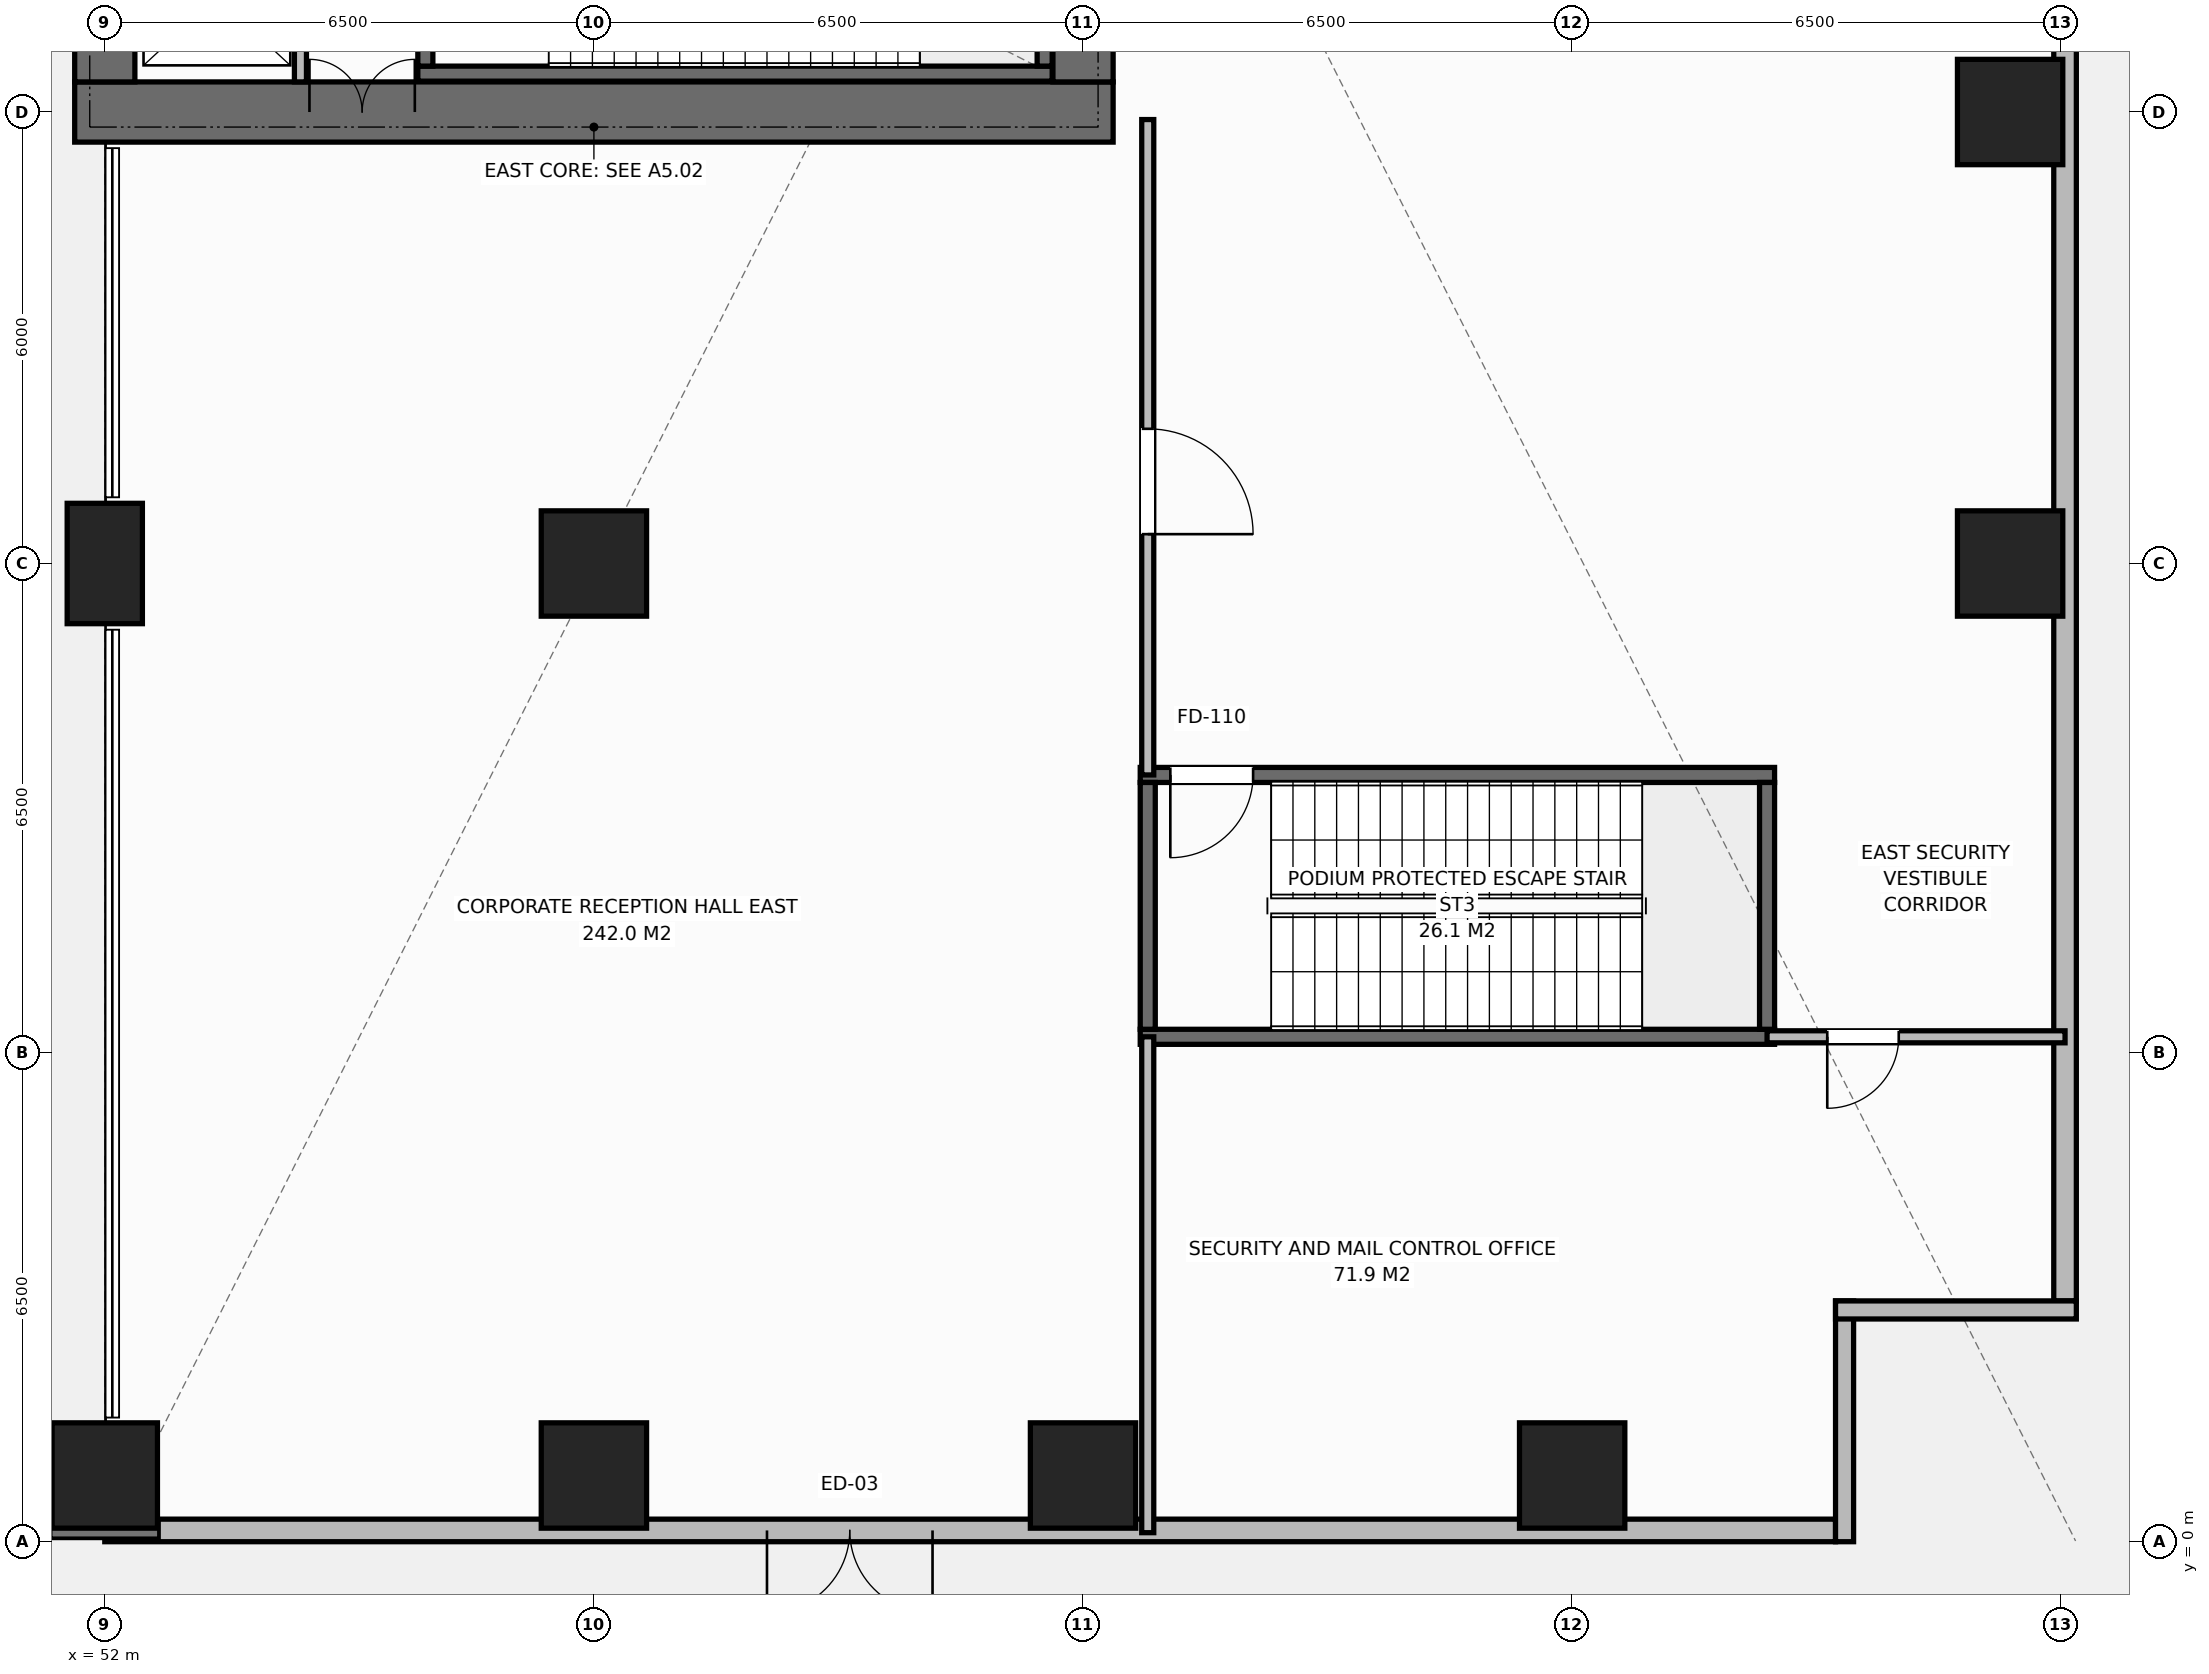
"""IFC4 building model, lengths in metres.
Left out: names, types, materials, properties, quantities, classifications, styles, units other than length and angle.
Written with IfcOpenShell. Run it as: python <this file> out.ifc"""

import sys

from ifc_helpers import new_model, si_unit, direction, frame, frame_2d, origin, origin_2d, place, context, subcontext, project, spatial, rectangle, extrude, element, fill, save


model = new_model("IFC4")
c1 = context("Model", 3, precision=1e-05, world=origin(), true_north=direction((0.0, 1.0)))
c2 = subcontext(c1, "Body", "Model", "MODEL_VIEW")
j1 = project(units=[si_unit("LENGTHUNIT", "METRE"), si_unit("PLANEANGLEUNIT", "RADIAN")], contexts=[c1])
p1 = place(None, origin())
s1 = spatial("IfcSite", under=j1, at=p1, CompositionType="ELEMENT")
p2 = place(p1, origin())
s2 = spatial("IfcBuilding", under=s1, at=p2, CompositionType="ELEMENT")
p3 = place(p2, origin())
s3 = spatial("IfcBuildingStorey", under=s2, at=p3, CompositionType="ELEMENT", Elevation=0.0)
p4 = place(p3, frame((51.6, 19.0, 0.0), z_axis=(0.0, 0.0, 1.0), x_axis=(1.0, 0.0, 0.0)))
e1 = element("IfcWall", 1, at=p4, inside=s3, PredefinedType="SHEAR", context=c2, shape_type="SweptSolid", body=[
    extrude(rectangle(XDim=13.8, YDim=0.8, at=frame_2d((6.9, 0.0))), origin(), (0.0, 0.0, 1.0), 6.0),
])
p5 = place(p4, frame((3.12, 0.0, 0.0)))
e2 = element("IfcOpeningElement", 2, at=p5, cuts=e1, PredefinedType="OPENING", context=c2, shape_type="SweptSolid", body=[
    extrude(rectangle(XDim=1.4, YDim=2.2, at=frame_2d((0.7, 1.1))), frame((0.0, 0.41, 0.0), z_axis=(0.0, -1.0, 0.0), x_axis=(1.0, 0.0, 0.0)), (0.0, 0.0, 1.0), 0.82),
])
p6 = place(p3, frame((52.0, 19.4, 0.0), z_axis=(0.0, 0.0, 1.0), x_axis=(0.0, 1.0, 0.0)))
e3 = element("IfcWall", 3, at=p6, inside=s3, PredefinedType="SHEAR", context=c2, shape_type="SweptSolid", body=[
    extrude(rectangle(XDim=13.2, YDim=0.8, at=frame_2d((6.6, 0.0))), origin(), (0.0, 0.0, 1.0), 6.0),
])
p7 = place(p3, frame((65.0, 19.4, 0.0), z_axis=(0.0, 0.0, 1.0), x_axis=(0.0, 1.0, 0.0)))
e4 = element("IfcWall", 4, at=p7, inside=s3, PredefinedType="SHEAR", context=c2, shape_type="SweptSolid", body=[
    extrude(rectangle(XDim=13.2, YDim=0.8, at=frame_2d((6.6, 0.0))), origin(), (0.0, 0.0, 1.0), 6.0),
])
p8 = place(p7, frame((8.05, 0.0, 0.0)))
e5 = element("IfcOpeningElement", 5, at=p8, cuts=e4, PredefinedType="OPENING", context=c2, shape_type="SweptSolid", body=[
    extrude(rectangle(XDim=1.3, YDim=2.2, at=frame_2d((0.65, 1.1))), frame((0.0, 0.41, 0.0), z_axis=(0.0, -1.0, 0.0), x_axis=(1.0, 0.0, 0.0)), (0.0, 0.0, 1.0), 0.82),
])
p9 = place(p3, frame((56.16, 19.51, 0.0), z_axis=(0.0, 0.0, 1.0), x_axis=(1.0, 0.0, 0.0)))
e6 = element("IfcWall", 6, at=p9, inside=s3, PredefinedType="SHEAR", context=c2, shape_type="SweptSolid", body=[
    extrude(rectangle(XDim=8.43, YDim=0.2, at=frame_2d((4.215, 0.0))), origin(), (0.0, 0.0, 1.0), 6.0),
])
for number, where, z_axis, x_axis in (
    (7, (56.26, 19.61, 0.0), (0.0, 0.0, 1.0), (0.0, 1.0, 0.0)),
    (8, (64.49, 19.61, 0.0), (0.0, 0.0, 1.0), (0.0, 1.0, 0.0)),
):
    element("IfcWall", number, at=place(p3, frame(where, z_axis=z_axis, x_axis=x_axis)), inside=s3, PredefinedType="SHEAR", context=c2, shape_type="SweptSolid", body=[
        extrude(rectangle(XDim=3.28, YDim=0.2, at=frame_2d((1.64, 0.0))), origin(), (0.0, 0.0, 1.0), 6.0),
    ])
p10 = place(p3, frame((65.76, 6.71, 0.0), z_axis=(0.0, 0.0, 1.0), x_axis=(1.0, 0.0, 0.0)))
e9 = element("IfcWall", 9, at=p10, inside=s3, PredefinedType="SHEAR", context=c2, shape_type="SweptSolid", body=[
    extrude(rectangle(XDim=8.43, YDim=0.2, at=frame_2d((4.215, 0.0))), origin(), (0.0, 0.0, 1.0), 6.0),
])
p11 = place(p3, frame((65.76, 10.19, 0.0), z_axis=(0.0, 0.0, 1.0), x_axis=(1.0, 0.0, 0.0)))
e10 = element("IfcWall", 10, at=p11, inside=s3, PredefinedType="SHEAR", context=c2, shape_type="SweptSolid", body=[
    extrude(rectangle(XDim=8.43, YDim=0.2, at=frame_2d((4.215, 0.0))), origin(), (0.0, 0.0, 1.0), 6.0),
])
p12 = place(p11, frame((0.4, 0.0, 0.0)))
e11 = element("IfcOpeningElement", 11, at=p12, cuts=e10, PredefinedType="OPENING", context=c2, shape_type="SweptSolid", body=[
    extrude(rectangle(XDim=1.1, YDim=2.15, at=frame_2d((0.55, 1.075))), frame((0.0, 0.11, 0.0), z_axis=(0.0, -1.0, 0.0), x_axis=(1.0, 0.0, 0.0)), (0.0, 0.0, 1.0), 0.22),
])
for number, where, z_axis, x_axis in (
    (12, (65.86, 6.81, 0.0), (0.0, 0.0, 1.0), (0.0, 1.0, 0.0)),
    (13, (74.09, 6.81, 0.0), (0.0, 0.0, 1.0), (0.0, 1.0, 0.0)),
):
    element("IfcWall", number, at=place(p3, frame(where, z_axis=z_axis, x_axis=x_axis)), inside=s3, PredefinedType="SHEAR", context=c2, shape_type="SweptSolid", body=[
        extrude(rectangle(XDim=3.28, YDim=0.2, at=frame_2d((1.64, 0.0))), origin(), (0.0, 0.0, 1.0), 6.0),
    ])
p13 = place(p3, frame((58.5, 13.0, 0.0), z_axis=(0.0, 0.0, 1.0), x_axis=(1.0, 0.0, 0.0)))
e14 = element("IfcColumn", 14, at=p13, inside=s3, PredefinedType="COLUMN", context=c2, shape_type="SweptSolid", body=[
    extrude(rectangle(XDim=1.4, YDim=1.4, at=origin_2d()), origin(), (0.0, 0.0, 1.0), 6.0),
])
p14 = place(p3, frame((52.0, 13.0, 0.0), z_axis=(0.0, 0.0, 1.0), x_axis=(1.0, 0.0, 0.0)))
e15 = element("IfcColumn", 15, at=p14, inside=s3, PredefinedType="PILASTER", context=c2, shape_type="SweptSolid", body=[
    extrude(rectangle(XDim=1.0, YDim=1.6, at=origin_2d()), origin(), (0.0, 0.0, 1.0), 6.0),
])
for number, where, z_axis, x_axis in (
    (16, (52.0, 0.88, 0.0), (0.0, 0.0, 1.0), (1.0, 0.0, 0.0)),
    (17, (58.5, 0.88, 0.0), (0.0, 0.0, 1.0), (1.0, 0.0, 0.0)),
    (18, (65.0, 0.88, 0.0), (0.0, 0.0, 1.0), (1.0, 0.0, 0.0)),
    (19, (71.5, 0.88, 0.0), (0.0, 0.0, 1.0), (1.0, 0.0, 0.0)),
    (20, (77.32, 13.0, 0.0), (0.0, 0.0, 1.0), (1.0, 0.0, 0.0)),
    (21, (77.32, 19.0, 0.0), (0.0, 0.0, 1.0), (1.0, 0.0, 0.0)),
):
    element("IfcColumn", number, at=place(p3, frame(where, z_axis=z_axis, x_axis=x_axis)), inside=s3, PredefinedType="COLUMN", context=c2, shape_type="SweptSolid", body=[
        extrude(rectangle(XDim=1.4, YDim=1.4, at=origin_2d()), origin(), (0.0, 0.0, 1.0), 6.0),
    ])
p15 = place(p3, frame((75.0, 0.15, 0.0), z_axis=(0.0, 0.0, 1.0), x_axis=(-1.0, 0.0, 0.0)))
e22 = element("IfcWall", 22, at=p15, inside=s3, PredefinedType="STANDARD", context=c2, shape_type="SweptSolid", body=[
    extrude(rectangle(XDim=23.0, YDim=0.3, at=frame_2d((11.5, 0.0))), origin(), (0.0, 0.0, 1.0), 5.72),
])
p16 = place(p15, frame((12.0, 0.0, 0.0)))
e23 = element("IfcOpeningElement", 23, at=p16, cuts=e22, PredefinedType="OPENING", context=c2, shape_type="SweptSolid", body=[
    extrude(rectangle(XDim=2.2, YDim=2.4, at=frame_2d((1.1, 1.2))), frame((0.0, 0.16, 0.0), z_axis=(0.0, -1.0, 0.0), x_axis=(1.0, 0.0, 0.0)), (0.0, 0.0, 1.0), 0.32),
])
p17 = place(p3, frame((78.05, 48.8, 0.0), z_axis=(0.0, 0.0, 1.0), x_axis=(0.0, -1.0, 0.0)))
e24 = element("IfcWall", 24, at=p17, inside=s3, PredefinedType="STANDARD", context=c2, shape_type="SweptSolid", body=[
    extrude(rectangle(XDim=45.6, YDim=0.3, at=frame_2d((22.8, 0.0))), origin(), (0.0, 0.0, 1.0), 5.72),
])
p18 = place(p17, frame((2.6, 0.0, 0.0)))
e25 = element("IfcOpeningElement", 25, at=p18, cuts=e24, PredefinedType="OPENING", context=c2, shape_type="SweptSolid", body=[
    extrude(rectangle(XDim=6.0, YDim=3.2, at=frame_2d((3.0, 1.6))), frame((0.0, 0.16, 0.0), z_axis=(0.0, -1.0, 0.0), x_axis=(1.0, 0.0, 0.0)), (0.0, 0.0, 1.0), 0.32),
])
p19 = place(p17, frame((25.6, 0.0, 0.0)))
e26 = element("IfcOpeningElement", 26, at=p19, cuts=e24, PredefinedType="OPENING", context=c2, shape_type="SweptSolid", body=[
    extrude(rectangle(XDim=2.2, YDim=2.4, at=frame_2d((1.1, 1.2))), frame((0.0, 0.16, 0.0), z_axis=(0.0, -1.0, 0.0), x_axis=(1.0, 0.0, 0.0)), (0.0, 0.0, 1.0), 0.32),
])
for number, where, z_axis, x_axis in (
    (27, (75.12, 3.2, 0.0), (0.0, 0.0, 1.0), (0.0, -1.0, 0.0)),
    (28, (78.2, 3.08, 0.0), (0.0, 0.0, 1.0), (-1.0, 0.0, 0.0)),
):
    element("IfcWall", number, at=place(p3, frame(where, z_axis=z_axis, x_axis=x_axis)), inside=s3, PredefinedType="STANDARD", context=c2, shape_type="SweptSolid", body=[
        extrude(rectangle(XDim=3.2, YDim=0.24, at=frame_2d((1.6, 0.0))), origin(), (0.0, 0.0, 1.0), 5.72),
    ])
p20 = place(p3, frame((54.6, 19.4, 0.0), z_axis=(0.0, 0.0, 1.0), x_axis=(0.0, 1.0, 0.0)))
e29 = element("IfcWall", 29, at=p20, inside=s3, PredefinedType="STANDARD", context=c2, shape_type="SweptSolid", body=[
    extrude(rectangle(XDim=13.2, YDim=0.16, at=frame_2d((6.6, 0.0))), origin(), (0.0, 0.0, 1.0), 5.72),
])
p21 = place(p20, frame((0.55, 0.0, 0.0)))
e30 = element("IfcOpeningElement", 30, at=p21, cuts=e29, PredefinedType="OPENING", context=c2, shape_type="SweptSolid", body=[
    extrude(rectangle(XDim=1.1, YDim=2.2, at=frame_2d((0.55, 1.1))), frame((0.0, 0.09, 0.0), z_axis=(0.0, -1.0, 0.0), x_axis=(1.0, 0.0, 0.0)), (0.0, 0.0, 1.0), 0.18),
])
p22 = place(p20, frame((2.7, 0.0, 0.0)))
e31 = element("IfcOpeningElement", 31, at=p22, cuts=e29, PredefinedType="OPENING", context=c2, shape_type="SweptSolid", body=[
    extrude(rectangle(XDim=1.1, YDim=2.2, at=frame_2d((0.55, 1.1))), frame((0.0, 0.09, 0.0), z_axis=(0.0, -1.0, 0.0), x_axis=(1.0, 0.0, 0.0)), (0.0, 0.0, 1.0), 0.18),
])
p23 = place(p20, frame((4.9, 0.0, 0.0)))
e32 = element("IfcOpeningElement", 32, at=p23, cuts=e29, PredefinedType="OPENING", context=c2, shape_type="SweptSolid", body=[
    extrude(rectangle(XDim=1.1, YDim=2.2, at=frame_2d((0.55, 1.1))), frame((0.0, 0.09, 0.0), z_axis=(0.0, -1.0, 0.0), x_axis=(1.0, 0.0, 0.0)), (0.0, 0.0, 1.0), 0.18),
])
p24 = place(p20, frame((7.05, 0.0, 0.0)))
e33 = element("IfcOpeningElement", 33, at=p24, cuts=e29, PredefinedType="OPENING", context=c2, shape_type="SweptSolid", body=[
    extrude(rectangle(XDim=1.1, YDim=2.2, at=frame_2d((0.55, 1.1))), frame((0.0, 0.09, 0.0), z_axis=(0.0, -1.0, 0.0), x_axis=(1.0, 0.0, 0.0)), (0.0, 0.0, 1.0), 0.18),
])
p25 = place(p20, frame((9.2, 0.0, 0.0)))
e34 = element("IfcOpeningElement", 34, at=p25, cuts=e29, PredefinedType="OPENING", context=c2, shape_type="SweptSolid", body=[
    extrude(rectangle(XDim=1.1, YDim=2.2, at=frame_2d((0.55, 1.1))), frame((0.0, 0.09, 0.0), z_axis=(0.0, -1.0, 0.0), x_axis=(1.0, 0.0, 0.0)), (0.0, 0.0, 1.0), 0.18),
])
p26 = place(p20, frame((11.4, 0.0, 0.0)))
e35 = element("IfcOpeningElement", 35, at=p26, cuts=e29, PredefinedType="OPENING", context=c2, shape_type="SweptSolid", body=[
    extrude(rectangle(XDim=1.1, YDim=2.2, at=frame_2d((0.55, 1.1))), frame((0.0, 0.09, 0.0), z_axis=(0.0, -1.0, 0.0), x_axis=(1.0, 0.0, 0.0)), (0.0, 0.0, 1.0), 0.18),
])
p27 = place(p3, frame((65.86, 0.12, 0.0), z_axis=(0.0, 0.0, 1.0), x_axis=(0.0, 1.0, 0.0)))
e36 = element("IfcWall", 36, at=p27, inside=s3, PredefinedType="STANDARD", context=c2, shape_type="SweptSolid", body=[
    extrude(rectangle(XDim=6.59, YDim=0.16, at=frame_2d((3.295, 0.0))), origin(), (0.0, 0.0, 1.0), 5.72),
])
p28 = place(p3, frame((74.09, 6.71, 0.0), z_axis=(0.0, 0.0, 1.0), x_axis=(1.0, 0.0, 0.0)))
e37 = element("IfcWall", 37, at=p28, inside=s3, PredefinedType="STANDARD", context=c2, shape_type="SweptSolid", body=[
    extrude(rectangle(XDim=3.96, YDim=0.16, at=frame_2d((1.98, 0.0))), origin(), (0.0, 0.0, 1.0), 5.72),
])
p29 = place(p28, frame((0.8, 0.0, 0.0)))
e38 = element("IfcOpeningElement", 38, at=p29, cuts=e37, PredefinedType="OPENING", context=c2, shape_type="SweptSolid", body=[
    extrude(rectangle(XDim=0.95, YDim=2.15, at=frame_2d((0.475, 1.075))), frame((0.0, 0.09, 0.0), z_axis=(0.0, -1.0, 0.0), x_axis=(1.0, 0.0, 0.0)), (0.0, 0.0, 1.0), 0.18),
])
p30 = place(p3, frame((65.86, 10.19, 0.0), z_axis=(0.0, 0.0, 1.0), x_axis=(0.0, 1.0, 0.0)))
e39 = element("IfcWall", 39, at=p30, inside=s3, PredefinedType="STANDARD", context=c2, shape_type="SweptSolid", body=[
    extrude(rectangle(XDim=8.71, YDim=0.16, at=frame_2d((4.355, 0.0))), origin(), (0.0, 0.0, 1.0), 5.72),
])
p31 = place(p30, frame((3.2, 0.0, 0.0)))
e40 = element("IfcOpeningElement", 40, at=p31, cuts=e39, PredefinedType="OPENING", context=c2, shape_type="SweptSolid", body=[
    extrude(rectangle(XDim=1.4, YDim=2.2, at=frame_2d((0.7, 1.1))), frame((0.0, 0.09, 0.0), z_axis=(0.0, -1.0, 0.0), x_axis=(1.0, 0.0, 0.0)), (0.0, 0.0, 1.0), 0.18),
])
p32 = place(p16, origin())
e41 = element("IfcDoor", 41, at=p32, inside=s3, OperationType="DOUBLE_DOOR_SINGLE_SWING", PredefinedType="DOOR", context=c2, shape_type="SweptSolid", body=[
    extrude(rectangle(XDim=2.2, YDim=2.4, at=frame_2d((1.1, 1.2))), frame((0.0, 0.025, 0.0), z_axis=(0.0, -1.0, 0.0), x_axis=(1.0, 0.0, 0.0)), (0.0, 0.0, 1.0), 0.05),
])
fill(e23, e41)
p33 = place(p5, origin())
e42 = element("IfcDoor", 42, at=p33, inside=s3, OperationType="DOUBLE_DOOR_SINGLE_SWING", PredefinedType="DOOR", context=c2, shape_type="SweptSolid", body=[
    extrude(rectangle(XDim=1.4, YDim=2.2, at=frame_2d((0.7, 1.1))), frame((0.0, 0.125, 0.0), z_axis=(0.0, -1.0, 0.0), x_axis=(1.0, 0.0, 0.0)), (0.0, 0.0, 1.0), 0.05),
])
fill(e2, e42)
p34 = place(p12, origin())
e43 = element("IfcDoor", 43, at=p34, inside=s3, OperationType="SINGLE_SWING_RIGHT", PredefinedType="DOOR", context=c2, shape_type="SweptSolid", body=[
    extrude(rectangle(XDim=1.1, YDim=2.15, at=frame_2d((0.55, 1.075))), frame((0.0, 0.025, 0.0), z_axis=(0.0, -1.0, 0.0), x_axis=(1.0, 0.0, 0.0)), (0.0, 0.0, 1.0), 0.05),
])
fill(e11, e43)
p35 = place(p29, origin())
e44 = element("IfcDoor", 44, at=p35, inside=s3, OperationType="SINGLE_SWING_RIGHT", PredefinedType="DOOR", context=c2, shape_type="SweptSolid", body=[
    extrude(rectangle(XDim=0.95, YDim=2.15, at=frame_2d((0.475, 1.075))), frame((0.0, 0.025, 0.0), z_axis=(0.0, -1.0, 0.0), x_axis=(1.0, 0.0, 0.0)), (0.0, 0.0, 1.0), 0.05),
])
fill(e38, e44)
p36 = place(p31, origin())
e45 = element("IfcDoor", 45, at=p36, inside=s3, OperationType="SINGLE_SWING_RIGHT", PredefinedType="DOOR", context=c2, shape_type="SweptSolid", body=[
    extrude(rectangle(XDim=1.4, YDim=2.2, at=frame_2d((0.7, 1.1))), frame((0.0, 0.025, 0.0), z_axis=(0.0, -1.0, 0.0), x_axis=(1.0, 0.0, 0.0)), (0.0, 0.0, 1.0), 0.05),
])
fill(e40, e45)
save(model, sys.argv[1])
